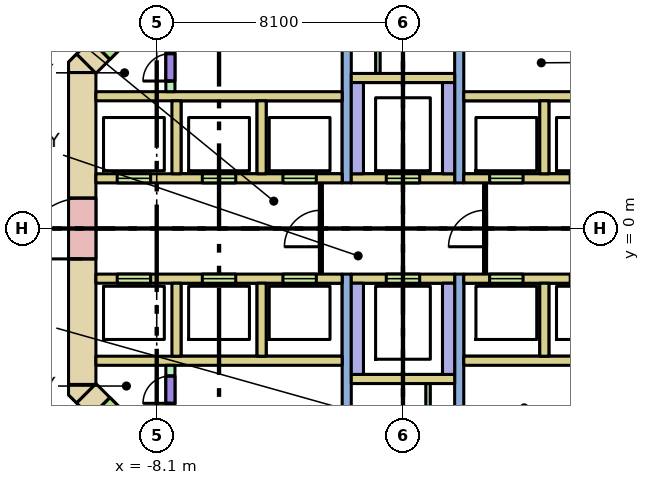
"""IFC4 building model, lengths in metres.
Left out: names, types, materials, properties, quantities, classifications, styles, units other than length and angle.
Written with IfcOpenShell. Run it as: python <this file> out.ifc"""

import sys

from ifc_helpers import new_model, si_unit, direction, frame, frame_2d, origin, place, context, subcontext, project, spatial, polyline, rectangle, outline, extrude, element, fill, save


model = new_model("IFC4")
c1 = context("Model", 3, precision=1e-05, world=origin(), true_north=direction((0.0, 1.0)))
c2 = subcontext(c1, "Body", "Model", "MODEL_VIEW")
j1 = project(units=[si_unit("LENGTHUNIT", "METRE"), si_unit("PLANEANGLEUNIT", "RADIAN")], contexts=[c1])
p1 = place(None, origin())
s1 = spatial("IfcSite", under=j1, at=p1, CompositionType="ELEMENT")
p2 = place(p1, origin())
s2 = spatial("IfcBuilding", under=s1, at=p2, CompositionType="ELEMENT")
p3 = place(p2, frame((0.0, 0.0, -3.6)))
s3 = spatial("IfcBuildingStorey", under=s2, at=p3, CompositionType="ELEMENT", Elevation=-3.6)
p4 = place(p3, frame((-10.55, -5.13, -0.32), z_axis=(0.0, 0.0, 1.0), x_axis=(0.0, 1.0, 0.0)))
e1 = element("IfcWall", 1, at=p4, inside=s3, PredefinedType="SHEAR", context=c2, shape_type="SweptSolid", body=[
    extrude(rectangle(XDim=10.26, YDim=0.9, at=frame_2d((5.13, 0.0))), origin(), (0.0, 0.0, 1.0), 3.6),
])
p5 = place(p4, frame((4.13, 0.0, 0.32)))
e2 = element("IfcOpeningElement", 2, at=p5, cuts=e1, PredefinedType="OPENING", context=c2, shape_type="SweptSolid", body=[
    extrude(rectangle(XDim=2.0, YDim=2.1, at=frame_2d((1.0, 1.05))), frame((0.0, 0.46, 0.0), z_axis=(0.0, -1.0, 0.0), x_axis=(1.0, 0.0, 0.0)), (0.0, 0.0, 1.0), 0.92),
])
p6 = place(p3, frame((-10.418, 5.418, -0.32), z_axis=(0.0, 0.0, 1.0), x_axis=(0.707106781187, 0.707106781187, 0.0)))
e3 = element("IfcWall", 3, at=p6, inside=s3, PredefinedType="SHEAR", context=c2, shape_type="SweptSolid", body=[
    extrude(rectangle(XDim=4.243, YDim=0.9, at=frame_2d((2.121, 0.0))), origin(), (0.0, 0.0, 1.0), 3.6),
])
p7 = place(p6, frame((0.65, 0.0, 0.32)))
e4 = element("IfcOpeningElement", 4, at=p7, cuts=e3, PredefinedType="OPENING", context=c2, shape_type="SweptSolid", body=[
    extrude(rectangle(XDim=1.2, YDim=2.1, at=frame_2d((0.6, 1.05))), frame((0.0, 0.46, 0.0), z_axis=(0.0, -1.0, 0.0), x_axis=(1.0, 0.0, 0.0)), (0.0, 0.0, 1.0), 0.92),
])
p8 = place(p3, frame((-7.418, -8.418, -0.32), z_axis=(0.0, 0.0, 1.0), x_axis=(-0.707106781187, 0.707106781187, 0.0)))
e5 = element("IfcWall", 5, at=p8, inside=s3, PredefinedType="SHEAR", context=c2, shape_type="SweptSolid", body=[
    extrude(rectangle(XDim=4.243, YDim=0.9, at=frame_2d((2.121, 0.0))), origin(), (0.0, 0.0, 1.0), 3.6),
])
p9 = place(p8, frame((2.393, 0.0, 0.32)))
e6 = element("IfcOpeningElement", 6, at=p9, cuts=e5, PredefinedType="OPENING", context=c2, shape_type="SweptSolid", body=[
    extrude(rectangle(XDim=1.2, YDim=2.1, at=frame_2d((0.6, 1.05))), frame((0.0, 0.46, 0.0), z_axis=(0.0, -1.0, 0.0), x_axis=(1.0, 0.0, 0.0)), (0.0, 0.0, 1.0), 0.92),
])
p10 = place(p3, frame((0.0, 0.0, -0.32)))
e7 = element("IfcWall", 7, at=p10, inside=s3, PredefinedType="SHEAR", context=c2, shape_type="SweptSolid", body=[
    extrude(outline(polyline([(-11.0, -5.473), (-11.0, -5.13), (-10.13, -5.13), (-10.736, -5.736), (-11.0, -5.473)])), origin(), (0.0, 0.0, 1.0), 3.6),
])
p11 = place(p3, frame((0.0, 0.0, -0.32)))
e8 = element("IfcWall", 8, at=p11, inside=s3, PredefinedType="SHEAR", context=c2, shape_type="SweptSolid", body=[
    extrude(outline(polyline([(-10.736, 5.736), (-10.13, 5.13), (-11.0, 5.13), (-11.0, 5.473), (-10.736, 5.736)])), origin(), (0.0, 0.0, 1.0), 3.6),
])
for number, where, z_axis, x_axis in (
    (9, (-10.1, 4.35, 0.0), (0.0, 0.0, 1.0), (1.0, 0.0, 0.0)),
    (10, (-10.1, -4.35, 0.0), (0.0, 0.0, 1.0), (1.0, 0.0, 0.0)),
    (11, (2.0, 4.35, 0.0), (0.0, 0.0, 1.0), (1.0, 0.0, 0.0)),
    (12, (2.0, -4.35, 0.0), (0.0, 0.0, 1.0), (1.0, 0.0, 0.0)),
):
    element("IfcWall", number, at=place(p3, frame(where, z_axis=z_axis, x_axis=x_axis)), inside=s3, PredefinedType="SOLIDWALL", context=c2, shape_type="SweptSolid", body=[
        extrude(rectangle(XDim=8.1, YDim=0.3, at=frame_2d((4.05, 0.0))), origin(), (0.0, 0.0, 1.0), 3.28),
    ])
p12 = place(p3, frame((-10.1, 1.65, 0.0), z_axis=(0.0, 0.0, 1.0), x_axis=(1.0, 0.0, 0.0)))
e13 = element("IfcWall", 13, at=p12, inside=s3, PredefinedType="SOLIDWALL", context=c2, shape_type="SweptSolid", body=[
    extrude(rectangle(XDim=8.1, YDim=0.3, at=frame_2d((4.05, 0.0))), origin(), (0.0, 0.0, 1.0), 3.28),
])
p13 = place(p12, frame((0.7, 0.0, 0.0)))
e14 = element("IfcOpeningElement", 14, at=p13, cuts=e13, PredefinedType="OPENING", context=c2, shape_type="SweptSolid", body=[
    extrude(rectangle(XDim=1.1, YDim=2.1, at=frame_2d((0.55, 1.05))), frame((0.0, 0.16, 0.0), z_axis=(0.0, -1.0, 0.0), x_axis=(1.0, 0.0, 0.0)), (0.0, 0.0, 1.0), 0.32),
])
p14 = place(p12, frame((3.5, 0.0, 0.0)))
e15 = element("IfcOpeningElement", 15, at=p14, cuts=e13, PredefinedType="OPENING", context=c2, shape_type="SweptSolid", body=[
    extrude(rectangle(XDim=1.1, YDim=2.1, at=frame_2d((0.55, 1.05))), frame((0.0, 0.16, 0.0), z_axis=(0.0, -1.0, 0.0), x_axis=(1.0, 0.0, 0.0)), (0.0, 0.0, 1.0), 0.32),
])
p15 = place(p12, frame((6.15, 0.0, 0.0)))
e16 = element("IfcOpeningElement", 16, at=p15, cuts=e13, PredefinedType="OPENING", context=c2, shape_type="SweptSolid", body=[
    extrude(rectangle(XDim=1.1, YDim=2.1, at=frame_2d((0.55, 1.05))), frame((0.0, 0.16, 0.0), z_axis=(0.0, -1.0, 0.0), x_axis=(1.0, 0.0, 0.0)), (0.0, 0.0, 1.0), 0.32),
])
p16 = place(p3, frame((-10.1, -1.65, 0.0), z_axis=(0.0, 0.0, 1.0), x_axis=(1.0, 0.0, 0.0)))
e17 = element("IfcWall", 17, at=p16, inside=s3, PredefinedType="SOLIDWALL", context=c2, shape_type="SweptSolid", body=[
    extrude(rectangle(XDim=8.1, YDim=0.3, at=frame_2d((4.05, 0.0))), origin(), (0.0, 0.0, 1.0), 3.28),
])
p17 = place(p16, frame((0.7, 0.0, 0.0)))
e18 = element("IfcOpeningElement", 18, at=p17, cuts=e17, PredefinedType="OPENING", context=c2, shape_type="SweptSolid", body=[
    extrude(rectangle(XDim=1.1, YDim=2.1, at=frame_2d((0.55, 1.05))), frame((0.0, 0.16, 0.0), z_axis=(0.0, -1.0, 0.0), x_axis=(1.0, 0.0, 0.0)), (0.0, 0.0, 1.0), 0.32),
])
p18 = place(p16, frame((3.5, 0.0, 0.0)))
e19 = element("IfcOpeningElement", 19, at=p18, cuts=e17, PredefinedType="OPENING", context=c2, shape_type="SweptSolid", body=[
    extrude(rectangle(XDim=1.1, YDim=2.1, at=frame_2d((0.55, 1.05))), frame((0.0, 0.16, 0.0), z_axis=(0.0, -1.0, 0.0), x_axis=(1.0, 0.0, 0.0)), (0.0, 0.0, 1.0), 0.32),
])
p19 = place(p16, frame((6.15, 0.0, 0.0)))
e20 = element("IfcOpeningElement", 20, at=p19, cuts=e17, PredefinedType="OPENING", context=c2, shape_type="SweptSolid", body=[
    extrude(rectangle(XDim=1.1, YDim=2.1, at=frame_2d((0.55, 1.05))), frame((0.0, 0.16, 0.0), z_axis=(0.0, -1.0, 0.0), x_axis=(1.0, 0.0, 0.0)), (0.0, 0.0, 1.0), 0.32),
])
p20 = place(p3, frame((2.0, 1.65, 0.0), z_axis=(0.0, 0.0, 1.0), x_axis=(1.0, 0.0, 0.0)))
e21 = element("IfcWall", 21, at=p20, inside=s3, PredefinedType="SOLIDWALL", context=c2, shape_type="SweptSolid", body=[
    extrude(rectangle(XDim=8.1, YDim=0.3, at=frame_2d((4.05, 0.0))), origin(), (0.0, 0.0, 1.0), 3.28),
])
p21 = place(p20, frame((0.85, 0.0, 0.0)))
e22 = element("IfcOpeningElement", 22, at=p21, cuts=e21, PredefinedType="OPENING", context=c2, shape_type="SweptSolid", body=[
    extrude(rectangle(XDim=1.1, YDim=2.1, at=frame_2d((0.55, 1.05))), frame((0.0, 0.16, 0.0), z_axis=(0.0, -1.0, 0.0), x_axis=(1.0, 0.0, 0.0)), (0.0, 0.0, 1.0), 0.32),
])
p22 = place(p20, frame((3.5, 0.0, 0.0)))
e23 = element("IfcOpeningElement", 23, at=p22, cuts=e21, PredefinedType="OPENING", context=c2, shape_type="SweptSolid", body=[
    extrude(rectangle(XDim=1.1, YDim=2.1, at=frame_2d((0.55, 1.05))), frame((0.0, 0.16, 0.0), z_axis=(0.0, -1.0, 0.0), x_axis=(1.0, 0.0, 0.0)), (0.0, 0.0, 1.0), 0.32),
])
p23 = place(p20, frame((6.3, 0.0, 0.0)))
e24 = element("IfcOpeningElement", 24, at=p23, cuts=e21, PredefinedType="OPENING", context=c2, shape_type="SweptSolid", body=[
    extrude(rectangle(XDim=1.1, YDim=2.1, at=frame_2d((0.55, 1.05))), frame((0.0, 0.16, 0.0), z_axis=(0.0, -1.0, 0.0), x_axis=(1.0, 0.0, 0.0)), (0.0, 0.0, 1.0), 0.32),
])
p24 = place(p3, frame((2.0, -1.65, 0.0), z_axis=(0.0, 0.0, 1.0), x_axis=(1.0, 0.0, 0.0)))
e25 = element("IfcWall", 25, at=p24, inside=s3, PredefinedType="SOLIDWALL", context=c2, shape_type="SweptSolid", body=[
    extrude(rectangle(XDim=8.1, YDim=0.3, at=frame_2d((4.05, 0.0))), origin(), (0.0, 0.0, 1.0), 3.28),
])
p25 = place(p24, frame((0.85, 0.0, 0.0)))
e26 = element("IfcOpeningElement", 26, at=p25, cuts=e25, PredefinedType="OPENING", context=c2, shape_type="SweptSolid", body=[
    extrude(rectangle(XDim=1.1, YDim=2.1, at=frame_2d((0.55, 1.05))), frame((0.0, 0.16, 0.0), z_axis=(0.0, -1.0, 0.0), x_axis=(1.0, 0.0, 0.0)), (0.0, 0.0, 1.0), 0.32),
])
p26 = place(p24, frame((3.5, 0.0, 0.0)))
e27 = element("IfcOpeningElement", 27, at=p26, cuts=e25, PredefinedType="OPENING", context=c2, shape_type="SweptSolid", body=[
    extrude(rectangle(XDim=1.1, YDim=2.1, at=frame_2d((0.55, 1.05))), frame((0.0, 0.16, 0.0), z_axis=(0.0, -1.0, 0.0), x_axis=(1.0, 0.0, 0.0)), (0.0, 0.0, 1.0), 0.32),
])
p27 = place(p24, frame((6.3, 0.0, 0.0)))
e28 = element("IfcOpeningElement", 28, at=p27, cuts=e25, PredefinedType="OPENING", context=c2, shape_type="SweptSolid", body=[
    extrude(rectangle(XDim=1.1, YDim=2.1, at=frame_2d((0.55, 1.05))), frame((0.0, 0.16, 0.0), z_axis=(0.0, -1.0, 0.0), x_axis=(1.0, 0.0, 0.0)), (0.0, 0.0, 1.0), 0.32),
])
for number, where, z_axis, x_axis in (
    (29, (-7.45, 1.8, 0.0), (0.0, 0.0, 1.0), (0.0, 1.0, 0.0)),
    (30, (-7.45, -4.2, 0.0), (0.0, 0.0, 1.0), (0.0, 1.0, 0.0)),
    (31, (-4.65, 1.8, 0.0), (0.0, 0.0, 1.0), (0.0, 1.0, 0.0)),
    (32, (-4.65, -4.2, 0.0), (0.0, 0.0, 1.0), (0.0, 1.0, 0.0)),
    (33, (4.65, 1.8, 0.0), (0.0, 0.0, 1.0), (0.0, 1.0, 0.0)),
    (34, (4.65, -4.2, 0.0), (0.0, 0.0, 1.0), (0.0, 1.0, 0.0)),
):
    element("IfcWall", number, at=place(p3, frame(where, z_axis=z_axis, x_axis=x_axis)), inside=s3, PredefinedType="SOLIDWALL", context=c2, shape_type="SweptSolid", body=[
        extrude(rectangle(XDim=2.4, YDim=0.3, at=frame_2d((1.2, 0.0))), origin(), (0.0, 0.0, 1.0), 3.28),
    ])
for number, where, z_axis, x_axis in (
    (35, (-1.85, 1.5, 0.0), (0.0, 0.0, 1.0), (0.0, 1.0, 0.0)),
    (36, (-1.85, -8.1, 0.0), (0.0, 0.0, 1.0), (0.0, 1.0, 0.0)),
    (37, (1.85, 1.5, 0.0), (0.0, 0.0, 1.0), (0.0, 1.0, 0.0)),
    (38, (1.85, -8.1, 0.0), (0.0, 0.0, 1.0), (0.0, 1.0, 0.0)),
):
    element("IfcWall", number, at=place(p3, frame(where, z_axis=z_axis, x_axis=x_axis)), inside=s3, PredefinedType="SHEAR", context=c2, shape_type="SweptSolid", body=[
        extrude(rectangle(XDim=6.6, YDim=0.3, at=frame_2d((3.3, 0.0))), origin(), (0.0, 0.0, 1.0), 3.28),
    ])
p28 = place(p3, frame((-1.7, 1.65, 0.0), z_axis=(0.0, 0.0, 1.0), x_axis=(1.0, 0.0, 0.0)))
e39 = element("IfcWall", 39, at=p28, inside=s3, PredefinedType="SOLIDWALL", context=c2, shape_type="SweptSolid", body=[
    extrude(rectangle(XDim=3.4, YDim=0.3, at=frame_2d((1.7, 0.0))), origin(), (0.0, 0.0, 1.0), 3.28),
])
p29 = place(p28, frame((1.15, 0.0, 0.0)))
e40 = element("IfcOpeningElement", 40, at=p29, cuts=e39, PredefinedType="OPENING", context=c2, shape_type="SweptSolid", body=[
    extrude(rectangle(XDim=1.1, YDim=2.1, at=frame_2d((0.55, 1.05))), frame((0.0, 0.16, 0.0), z_axis=(0.0, -1.0, 0.0), x_axis=(1.0, 0.0, 0.0)), (0.0, 0.0, 1.0), 0.32),
])
p30 = place(p3, frame((-1.7, -1.65, 0.0), z_axis=(0.0, 0.0, 1.0), x_axis=(1.0, 0.0, 0.0)))
e41 = element("IfcWall", 41, at=p30, inside=s3, PredefinedType="SOLIDWALL", context=c2, shape_type="SweptSolid", body=[
    extrude(rectangle(XDim=3.4, YDim=0.3, at=frame_2d((1.7, 0.0))), origin(), (0.0, 0.0, 1.0), 3.28),
])
p31 = place(p30, frame((1.15, 0.0, 0.0)))
e42 = element("IfcOpeningElement", 42, at=p31, cuts=e41, PredefinedType="OPENING", context=c2, shape_type="SweptSolid", body=[
    extrude(rectangle(XDim=1.1, YDim=2.1, at=frame_2d((0.55, 1.05))), frame((0.0, 0.16, 0.0), z_axis=(0.0, -1.0, 0.0), x_axis=(1.0, 0.0, 0.0)), (0.0, 0.0, 1.0), 0.32),
])
for number, where, z_axis, x_axis in (
    (43, (-1.5, 1.8, 0.0), (0.0, 0.0, 1.0), (0.0, 1.0, 0.0)),
    (44, (-1.5, -4.8, 0.0), (0.0, 0.0, 1.0), (0.0, 1.0, 0.0)),
    (45, (1.5, 1.8, 0.0), (0.0, 0.0, 1.0), (0.0, 1.0, 0.0)),
    (46, (1.5, -4.8, 0.0), (0.0, 0.0, 1.0), (0.0, 1.0, 0.0)),
):
    element("IfcWall", number, at=place(p3, frame(where, z_axis=z_axis, x_axis=x_axis)), inside=s3, PredefinedType="SOLIDWALL", context=c2, shape_type="SweptSolid", body=[
        extrude(rectangle(XDim=3.0, YDim=0.4, at=frame_2d((1.5, 0.0))), origin(), (0.0, 0.0, 1.0), 3.28),
    ])
for number, where, z_axis, x_axis in (
    (47, (-1.7, 4.95, 0.0), (0.0, 0.0, 1.0), (1.0, 0.0, 0.0)),
    (48, (-1.7, -4.95, 0.0), (0.0, 0.0, 1.0), (1.0, 0.0, 0.0)),
):
    element("IfcWall", number, at=place(p3, frame(where, z_axis=z_axis, x_axis=x_axis)), inside=s3, PredefinedType="SOLIDWALL", context=c2, shape_type="SweptSolid", body=[
        extrude(rectangle(XDim=3.4, YDim=0.3, at=frame_2d((1.7, 0.0))), origin(), (0.0, 0.0, 1.0), 3.28),
    ])
p32 = place(p3, frame((-7.65, 4.5, 0.0), z_axis=(0.0, 0.0, 1.0), x_axis=(0.0, 1.0, 0.0)))
e49 = element("IfcWall", 49, at=p32, inside=s3, PredefinedType="SHEAR", context=c2, shape_type="SweptSolid", body=[
    extrude(rectangle(XDim=3.14, YDim=0.3, at=frame_2d((1.57, 0.0))), origin(), (0.0, 0.0, 1.0), 3.28),
])
p33 = place(p32, frame((0.35, 0.0, 0.0)))
e50 = element("IfcOpeningElement", 50, at=p33, cuts=e49, PredefinedType="OPENING", context=c2, shape_type="SweptSolid", body=[
    extrude(rectangle(XDim=0.9, YDim=2.1, at=frame_2d((0.45, 1.05))), frame((0.0, 0.16, 0.0), z_axis=(0.0, -1.0, 0.0), x_axis=(1.0, 0.0, 0.0)), (0.0, 0.0, 1.0), 0.32),
])
p34 = place(p3, frame((-7.65, -7.64, 0.0), z_axis=(0.0, 0.0, 1.0), x_axis=(0.0, 1.0, 0.0)))
e51 = element("IfcWall", 51, at=p34, inside=s3, PredefinedType="SHEAR", context=c2, shape_type="SweptSolid", body=[
    extrude(rectangle(XDim=3.14, YDim=0.3, at=frame_2d((1.57, 0.0))), origin(), (0.0, 0.0, 1.0), 3.28),
])
p35 = place(p34, frame((1.89, 0.0, 0.0)))
e52 = element("IfcOpeningElement", 52, at=p35, cuts=e51, PredefinedType="OPENING", context=c2, shape_type="SweptSolid", body=[
    extrude(rectangle(XDim=0.9, YDim=2.1, at=frame_2d((0.45, 1.05))), frame((0.0, 0.16, 0.0), z_axis=(0.0, -1.0, 0.0), x_axis=(1.0, 0.0, 0.0)), (0.0, 0.0, 1.0), 0.32),
])
p36 = place(p3, frame((-2.7, -1.5, 0.0), z_axis=(0.0, 0.0, 1.0), x_axis=(0.0, 1.0, 0.0)))
e53 = element("IfcWall", 53, at=p36, inside=s3, PredefinedType="PARTITIONING", context=c2, shape_type="SweptSolid", body=[
    extrude(rectangle(XDim=3.0, YDim=0.1, at=frame_2d((1.5, 0.0))), origin(), (0.0, 0.0, 1.0), 3.28),
])
p37 = place(p36, frame((0.9, 0.0, 0.0)))
e54 = element("IfcOpeningElement", 54, at=p37, cuts=e53, PredefinedType="OPENING", context=c2, shape_type="SweptSolid", body=[
    extrude(rectangle(XDim=1.2, YDim=2.1, at=frame_2d((0.6, 1.05))), frame((0.0, 0.06, 0.0), z_axis=(0.0, -1.0, 0.0), x_axis=(1.0, 0.0, 0.0)), (0.0, 0.0, 1.0), 0.12),
])
p38 = place(p3, frame((2.7, -1.5, 0.0), z_axis=(0.0, 0.0, 1.0), x_axis=(0.0, 1.0, 0.0)))
e55 = element("IfcWall", 55, at=p38, inside=s3, PredefinedType="PARTITIONING", context=c2, shape_type="SweptSolid", body=[
    extrude(rectangle(XDim=3.0, YDim=0.1, at=frame_2d((1.5, 0.0))), origin(), (0.0, 0.0, 1.0), 3.28),
])
p39 = place(p38, frame((0.9, 0.0, 0.0)))
e56 = element("IfcOpeningElement", 56, at=p39, cuts=e55, PredefinedType="OPENING", context=c2, shape_type="SweptSolid", body=[
    extrude(rectangle(XDim=1.2, YDim=2.1, at=frame_2d((0.6, 1.05))), frame((0.0, 0.06, 0.0), z_axis=(0.0, -1.0, 0.0), x_axis=(1.0, 0.0, 0.0)), (0.0, 0.0, 1.0), 0.12),
])
for number, where, z_axis, x_axis in (
    (57, (-0.825, 5.1, 0.0), (0.0, 0.0, 1.0), (0.0, 1.0, 0.0)),
    (58, (0.825, -8.1, 0.0), (0.0, 0.0, 1.0), (0.0, 1.0, 0.0)),
):
    element("IfcWall", number, at=place(p3, frame(where, z_axis=z_axis, x_axis=x_axis)), inside=s3, PredefinedType="PARTITIONING", context=c2, shape_type="SweptSolid", body=[
        extrude(rectangle(XDim=3.0, YDim=0.15, at=frame_2d((1.5, 0.0))), origin(), (0.0, 0.0, 1.0), 3.28),
    ])
p40 = place(p13, origin())
e59 = element("IfcDoor", 59, at=p40, inside=s3, OperationType="DOUBLE_DOOR_SLIDING", PredefinedType="DOOR", context=c2, shape_type="SweptSolid", body=[
    extrude(rectangle(XDim=1.1, YDim=2.1, at=frame_2d((0.55, 1.05))), frame((0.0, 0.025, 0.0), z_axis=(0.0, -1.0, 0.0), x_axis=(1.0, 0.0, 0.0)), (0.0, 0.0, 1.0), 0.05),
])
fill(e14, e59)
p41 = place(p14, origin())
e60 = element("IfcDoor", 60, at=p41, inside=s3, OperationType="DOUBLE_DOOR_SLIDING", PredefinedType="DOOR", context=c2, shape_type="SweptSolid", body=[
    extrude(rectangle(XDim=1.1, YDim=2.1, at=frame_2d((0.55, 1.05))), frame((0.0, 0.025, 0.0), z_axis=(0.0, -1.0, 0.0), x_axis=(1.0, 0.0, 0.0)), (0.0, 0.0, 1.0), 0.05),
])
fill(e15, e60)
p42 = place(p15, origin())
e61 = element("IfcDoor", 61, at=p42, inside=s3, OperationType="DOUBLE_DOOR_SLIDING", PredefinedType="DOOR", context=c2, shape_type="SweptSolid", body=[
    extrude(rectangle(XDim=1.1, YDim=2.1, at=frame_2d((0.55, 1.05))), frame((0.0, 0.025, 0.0), z_axis=(0.0, -1.0, 0.0), x_axis=(1.0, 0.0, 0.0)), (0.0, 0.0, 1.0), 0.05),
])
fill(e16, e61)
p43 = place(p17, origin())
e62 = element("IfcDoor", 62, at=p43, inside=s3, OperationType="DOUBLE_DOOR_SLIDING", PredefinedType="DOOR", context=c2, shape_type="SweptSolid", body=[
    extrude(rectangle(XDim=1.1, YDim=2.1, at=frame_2d((0.55, 1.05))), frame((0.0, 0.025, 0.0), z_axis=(0.0, -1.0, 0.0), x_axis=(1.0, 0.0, 0.0)), (0.0, 0.0, 1.0), 0.05),
])
fill(e18, e62)
p44 = place(p18, origin())
e63 = element("IfcDoor", 63, at=p44, inside=s3, OperationType="DOUBLE_DOOR_SLIDING", PredefinedType="DOOR", context=c2, shape_type="SweptSolid", body=[
    extrude(rectangle(XDim=1.1, YDim=2.1, at=frame_2d((0.55, 1.05))), frame((0.0, 0.025, 0.0), z_axis=(0.0, -1.0, 0.0), x_axis=(1.0, 0.0, 0.0)), (0.0, 0.0, 1.0), 0.05),
])
fill(e19, e63)
p45 = place(p19, origin())
e64 = element("IfcDoor", 64, at=p45, inside=s3, OperationType="DOUBLE_DOOR_SLIDING", PredefinedType="DOOR", context=c2, shape_type="SweptSolid", body=[
    extrude(rectangle(XDim=1.1, YDim=2.1, at=frame_2d((0.55, 1.05))), frame((0.0, 0.025, 0.0), z_axis=(0.0, -1.0, 0.0), x_axis=(1.0, 0.0, 0.0)), (0.0, 0.0, 1.0), 0.05),
])
fill(e20, e64)
p46 = place(p21, origin())
e65 = element("IfcDoor", 65, at=p46, inside=s3, OperationType="DOUBLE_DOOR_SLIDING", PredefinedType="DOOR", context=c2, shape_type="SweptSolid", body=[
    extrude(rectangle(XDim=1.1, YDim=2.1, at=frame_2d((0.55, 1.05))), frame((0.0, 0.025, 0.0), z_axis=(0.0, -1.0, 0.0), x_axis=(1.0, 0.0, 0.0)), (0.0, 0.0, 1.0), 0.05),
])
fill(e22, e65)
p47 = place(p25, origin())
e66 = element("IfcDoor", 66, at=p47, inside=s3, OperationType="DOUBLE_DOOR_SLIDING", PredefinedType="DOOR", context=c2, shape_type="SweptSolid", body=[
    extrude(rectangle(XDim=1.1, YDim=2.1, at=frame_2d((0.55, 1.05))), frame((0.0, 0.025, 0.0), z_axis=(0.0, -1.0, 0.0), x_axis=(1.0, 0.0, 0.0)), (0.0, 0.0, 1.0), 0.05),
])
fill(e26, e66)
p48 = place(p29, origin())
e67 = element("IfcDoor", 67, at=p48, inside=s3, OperationType="DOUBLE_DOOR_SLIDING", PredefinedType="DOOR", context=c2, shape_type="SweptSolid", body=[
    extrude(rectangle(XDim=1.1, YDim=2.1, at=frame_2d((0.55, 1.05))), frame((0.0, 0.025, 0.0), z_axis=(0.0, -1.0, 0.0), x_axis=(1.0, 0.0, 0.0)), (0.0, 0.0, 1.0), 0.05),
])
fill(e40, e67)
p49 = place(p31, origin())
e68 = element("IfcDoor", 68, at=p49, inside=s3, OperationType="DOUBLE_DOOR_SLIDING", PredefinedType="DOOR", context=c2, shape_type="SweptSolid", body=[
    extrude(rectangle(XDim=1.1, YDim=2.1, at=frame_2d((0.55, 1.05))), frame((0.0, 0.025, 0.0), z_axis=(0.0, -1.0, 0.0), x_axis=(1.0, 0.0, 0.0)), (0.0, 0.0, 1.0), 0.05),
])
fill(e42, e68)
p50 = place(p33, origin())
e69 = element("IfcDoor", 69, at=p50, inside=s3, OperationType="SINGLE_SWING_LEFT", PredefinedType="DOOR", context=c2, shape_type="SweptSolid", body=[
    extrude(rectangle(XDim=0.9, YDim=2.1, at=frame_2d((0.45, 1.05))), frame((0.0, 0.025, 0.0), z_axis=(0.0, -1.0, 0.0), x_axis=(1.0, 0.0, 0.0)), (0.0, 0.0, 1.0), 0.05),
])
fill(e50, e69)
p51 = place(p35, origin())
e70 = element("IfcDoor", 70, at=p51, inside=s3, OperationType="SINGLE_SWING_LEFT", PredefinedType="DOOR", context=c2, shape_type="SweptSolid", body=[
    extrude(rectangle(XDim=0.9, YDim=2.1, at=frame_2d((0.45, 1.05))), frame((0.0, 0.025, 0.0), z_axis=(0.0, -1.0, 0.0), x_axis=(1.0, 0.0, 0.0)), (0.0, 0.0, 1.0), 0.05),
])
fill(e52, e70)
p52 = place(p5, origin())
e71 = element("IfcDoor", 71, at=p52, inside=s3, OperationType="DOUBLE_DOOR_SINGLE_SWING", PredefinedType="DOOR", context=c2, shape_type="SweptSolid", body=[
    extrude(rectangle(XDim=2.0, YDim=2.1, at=frame_2d((1.0, 1.05))), frame((0.0, 0.025, 0.0), z_axis=(0.0, -1.0, 0.0), x_axis=(1.0, 0.0, 0.0)), (0.0, 0.0, 1.0), 0.05),
])
fill(e2, e71)
p53 = place(p37, origin())
e72 = element("IfcDoor", 72, at=p53, inside=s3, OperationType="SINGLE_SWING_LEFT", PredefinedType="DOOR", context=c2, shape_type="SweptSolid", body=[
    extrude(rectangle(XDim=1.2, YDim=2.1, at=frame_2d((0.6, 1.05))), frame((0.0, 0.025, 0.0), z_axis=(0.0, -1.0, 0.0), x_axis=(1.0, 0.0, 0.0)), (0.0, 0.0, 1.0), 0.05),
])
fill(e54, e72)
p54 = place(p39, origin())
e73 = element("IfcDoor", 73, at=p54, inside=s3, OperationType="SINGLE_SWING_LEFT", PredefinedType="DOOR", context=c2, shape_type="SweptSolid", body=[
    extrude(rectangle(XDim=1.2, YDim=2.1, at=frame_2d((0.6, 1.05))), frame((0.0, 0.025, 0.0), z_axis=(0.0, -1.0, 0.0), x_axis=(1.0, 0.0, 0.0)), (0.0, 0.0, 1.0), 0.05),
])
fill(e56, e73)
save(model, sys.argv[1])
